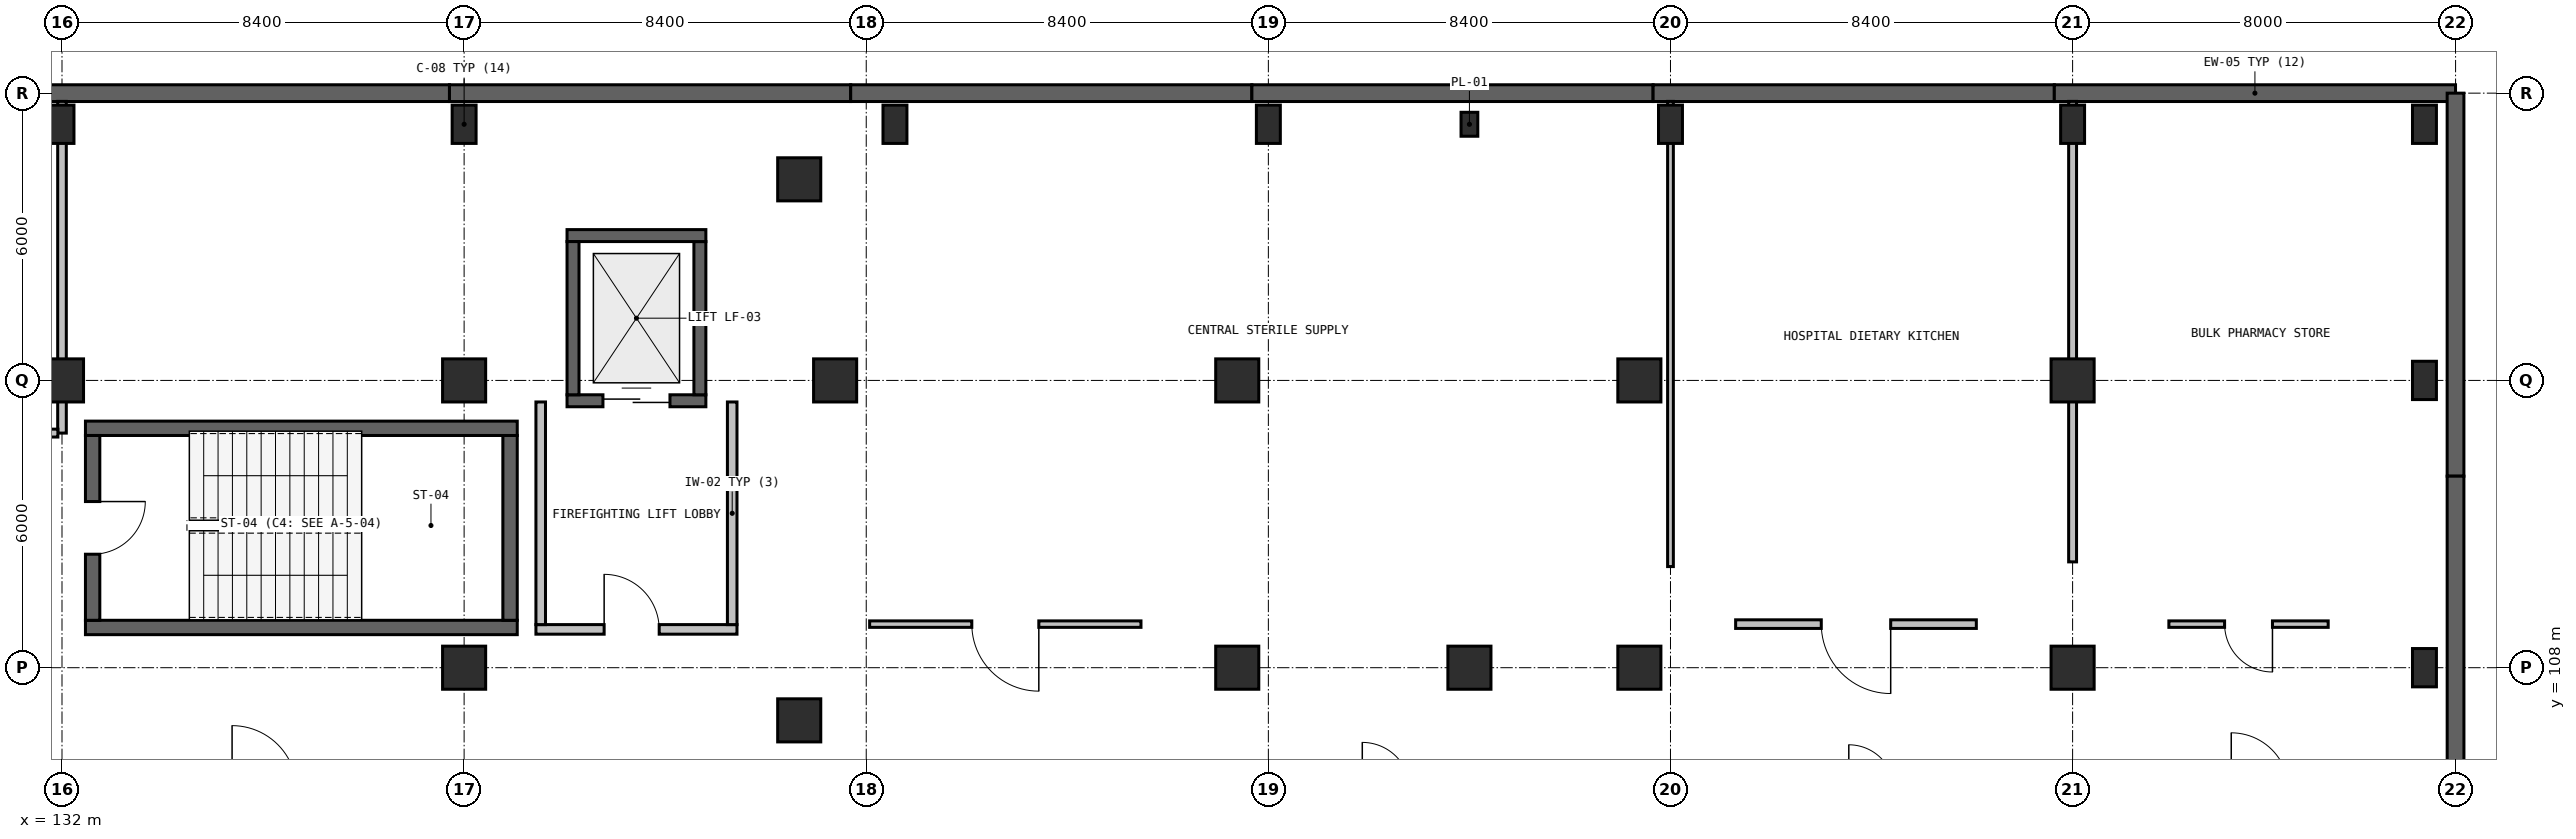
"""IFC4 building model, lengths in metres.
Left out: names, types, materials, properties, quantities, classifications, styles, units other than length and angle.
Written with IfcOpenShell. Run it as: python <this file> out.ifc"""

import sys

from ifc_helpers import new_model, si_unit, direction, frame, frame_2d, origin, origin_2d, place, context, subcontext, project, spatial, rectangle, extrude, element, fill, save


model = new_model("IFC4")
c1 = context("Model", 3, precision=1e-05, world=origin(), true_north=direction((0.0, 1.0)))
c2 = subcontext(c1, "Body", "Model", "MODEL_VIEW")
j1 = project(units=[si_unit("LENGTHUNIT", "METRE"), si_unit("PLANEANGLEUNIT", "RADIAN")], contexts=[c1])
p1 = place(None, origin())
s1 = spatial("IfcSite", under=j1, at=p1, CompositionType="ELEMENT")
p2 = place(p1, origin())
s2 = spatial("IfcBuilding", under=s1, at=p2, CompositionType="ELEMENT")
p3 = place(p2, frame((0.0, 0.0, -4.8)))
s3 = spatial("IfcBuildingStorey", under=s2, at=p3, CompositionType="ELEMENT", Elevation=-4.8)
for number, where, z_axis, x_axis in (
    (1, (147.4, 106.9, 0.0), (0.0, 0.0, 1.0), (1.0, 0.0, 0.0)),
    (2, (147.4, 118.2, 0.0), (0.0, 0.0, 1.0), (1.0, 0.0, 0.0)),
    (3, (161.4, 108.0, 0.0), (0.0, 0.0, 1.0), (1.0, 0.0, 0.0)),
):
    element("IfcColumn", number, at=place(p3, frame(where, z_axis=z_axis, x_axis=x_axis)), inside=s3, PredefinedType="COLUMN", context=c2, shape_type="SweptSolid", body=[
        extrude(rectangle(XDim=0.9, YDim=0.9, at=origin_2d()), origin(), (0.0, 0.0, 1.0), 4.8),
    ])
for number, where, z_axis, x_axis in (
    (4, (149.4, 119.35, 0.0), (0.0, 0.0, 1.0), (1.0, 0.0, 0.0)),
    (5, (157.2, 119.35, 0.0), (0.0, 0.0, 1.0), (1.0, 0.0, 0.0)),
    (6, (165.6, 119.35, 0.0), (0.0, 0.0, 1.0), (1.0, 0.0, 0.0)),
    (7, (174.0, 119.35, 0.0), (0.0, 0.0, 1.0), (1.0, 0.0, 0.0)),
    (8, (181.35, 119.35, 0.0), (0.0, 0.0, 1.0), (1.0, 0.0, 0.0)),
):
    element("IfcColumn", number, at=place(p3, frame(where, z_axis=z_axis, x_axis=x_axis)), inside=s3, PredefinedType="COLUMN", context=c2, shape_type="SweptSolid", body=[
        extrude(rectangle(XDim=0.5, YDim=0.8, at=origin_2d()), origin(), (0.0, 0.0, 1.0), 4.8),
    ])
p4 = place(p3, frame((132.0, 114.0, 0.0), z_axis=(0.0, 0.0, 1.0), x_axis=(1.0, 0.0, 0.0)))
e9 = element("IfcColumn", 9, at=p4, inside=s3, PredefinedType="COLUMN", context=c2, shape_type="SweptSolid", body=[
    extrude(rectangle(XDim=0.9, YDim=0.9, at=origin_2d()), origin(), (0.0, 0.0, 1.0), 4.8),
])
p5 = place(p3, frame((132.0, 119.35, 0.0), z_axis=(0.0, 0.0, 1.0), x_axis=(1.0, 0.0, 0.0)))
e10 = element("IfcColumn", 10, at=p5, inside=s3, PredefinedType="COLUMN", context=c2, shape_type="SweptSolid", body=[
    extrude(rectangle(XDim=0.5, YDim=0.8, at=origin_2d()), origin(), (0.0, 0.0, 1.0), 4.8),
])
for number, where, z_axis, x_axis in (
    (11, (140.4, 108.0, 0.0), (0.0, 0.0, 1.0), (1.0, 0.0, 0.0)),
    (12, (140.4, 114.0, 0.0), (0.0, 0.0, 1.0), (1.0, 0.0, 0.0)),
):
    element("IfcColumn", number, at=place(p3, frame(where, z_axis=z_axis, x_axis=x_axis)), inside=s3, PredefinedType="COLUMN", context=c2, shape_type="SweptSolid", body=[
        extrude(rectangle(XDim=0.9, YDim=0.9, at=origin_2d()), origin(), (0.0, 0.0, 1.0), 4.8),
    ])
p6 = place(p3, frame((140.4, 119.35, 0.0), z_axis=(0.0, 0.0, 1.0), x_axis=(1.0, 0.0, 0.0)))
e13 = element("IfcColumn", 13, at=p6, inside=s3, PredefinedType="COLUMN", context=c2, shape_type="SweptSolid", body=[
    extrude(rectangle(XDim=0.5, YDim=0.8, at=origin_2d()), origin(), (0.0, 0.0, 1.0), 4.8),
])
for number, where, z_axis, x_axis in (
    (14, (148.15, 114.0, 0.0), (0.0, 0.0, 1.0), (1.0, 0.0, 0.0)),
    (15, (156.55, 108.0, 0.0), (0.0, 0.0, 1.0), (1.0, 0.0, 0.0)),
    (16, (156.55, 114.0, 0.0), (0.0, 0.0, 1.0), (1.0, 0.0, 0.0)),
    (17, (164.95, 108.0, 0.0), (0.0, 0.0, 1.0), (1.0, 0.0, 0.0)),
    (18, (164.95, 114.0, 0.0), (0.0, 0.0, 1.0), (1.0, 0.0, 0.0)),
    (19, (174.0, 108.0, 0.0), (0.0, 0.0, 1.0), (1.0, 0.0, 0.0)),
    (20, (174.0, 114.0, 0.0), (0.0, 0.0, 1.0), (1.0, 0.0, 0.0)),
):
    element("IfcColumn", number, at=place(p3, frame(where, z_axis=z_axis, x_axis=x_axis)), inside=s3, PredefinedType="COLUMN", context=c2, shape_type="SweptSolid", body=[
        extrude(rectangle(XDim=0.9, YDim=0.9, at=origin_2d()), origin(), (0.0, 0.0, 1.0), 4.8),
    ])
for number, where, z_axis, x_axis in (
    (21, (181.35, 108.0, 0.0), (0.0, 0.0, 1.0), (1.0, 0.0, 0.0)),
    (22, (181.35, 114.0, 0.0), (0.0, 0.0, 1.0), (1.0, 0.0, 0.0)),
):
    element("IfcColumn", number, at=place(p3, frame(where, z_axis=z_axis, x_axis=x_axis)), inside=s3, PredefinedType="COLUMN", context=c2, shape_type="SweptSolid", body=[
        extrude(rectangle(XDim=0.5, YDim=0.8, at=origin_2d()), origin(), (0.0, 0.0, 1.0), 4.8),
    ])
p7 = place(p3, frame((161.4, 119.35, 0.0), z_axis=(0.0, 0.0, 1.0), x_axis=(1.0, 0.0, 0.0)))
e23 = element("IfcColumn", 23, at=p7, inside=s3, PredefinedType="PILASTER", context=c2, shape_type="SweptSolid", body=[
    extrude(rectangle(XDim=0.35, YDim=0.5, at=origin_2d()), origin(), (0.0, 0.0, 1.0), 4.8),
])
p8 = place(p3, frame((131.714, 120.0, 0.0), z_axis=(0.0, 0.0, 1.0), x_axis=(1.0, 0.0, 0.0)))
e24 = element("IfcWall", 24, at=p8, inside=s3, PredefinedType="SHEAR", context=c2, shape_type="SweptSolid", body=[
    extrude(rectangle(XDim=8.38, YDim=0.35, at=frame_2d((4.19, 0.0))), origin(), (0.0, 0.0, 1.0), 4.45),
])
p9 = place(p3, frame((140.094, 120.0, 0.0), z_axis=(0.0, 0.0, 1.0), x_axis=(1.0, 0.0, 0.0)))
e25 = element("IfcWall", 25, at=p9, inside=s3, PredefinedType="SHEAR", context=c2, shape_type="SweptSolid", body=[
    extrude(rectangle(XDim=8.381, YDim=0.35, at=frame_2d((4.19, 0.0))), origin(), (0.0, 0.0, 1.0), 4.45),
])
p10 = place(p3, frame((148.475, 120.0, 0.0), z_axis=(0.0, 0.0, 1.0), x_axis=(1.0, 0.0, 0.0)))
e26 = element("IfcWall", 26, at=p10, inside=s3, PredefinedType="SHEAR", context=c2, shape_type="SweptSolid", body=[
    extrude(rectangle(XDim=8.381, YDim=0.35, at=frame_2d((4.19, 0.0))), origin(), (0.0, 0.0, 1.0), 4.45),
])
p11 = place(p3, frame((156.856, 120.0, 0.0), z_axis=(0.0, 0.0, 1.0), x_axis=(1.0, 0.0, 0.0)))
e27 = element("IfcWall", 27, at=p11, inside=s3, PredefinedType="SHEAR", context=c2, shape_type="SweptSolid", body=[
    extrude(rectangle(XDim=8.381, YDim=0.35, at=frame_2d((4.19, 0.0))), origin(), (0.0, 0.0, 1.0), 4.45),
])
p12 = place(p3, frame((165.237, 120.0, 0.0), z_axis=(0.0, 0.0, 1.0), x_axis=(1.0, 0.0, 0.0)))
e28 = element("IfcWall", 28, at=p12, inside=s3, PredefinedType="SHEAR", context=c2, shape_type="SweptSolid", body=[
    extrude(rectangle(XDim=8.381, YDim=0.35, at=frame_2d((4.19, 0.0))), origin(), (0.0, 0.0, 1.0), 4.45),
])
p13 = place(p3, frame((173.618, 120.0, 0.0), z_axis=(0.0, 0.0, 1.0), x_axis=(1.0, 0.0, 0.0)))
e29 = element("IfcWall", 29, at=p13, inside=s3, PredefinedType="SHEAR", context=c2, shape_type="SweptSolid", body=[
    extrude(rectangle(XDim=8.381, YDim=0.35, at=frame_2d((4.19, 0.0))), origin(), (0.0, 0.0, 1.0), 4.45),
])
p14 = place(p3, frame((181.999, 120.0, 0.0), z_axis=(0.0, 0.0, 1.0), x_axis=(0.0, -1.0, 0.0)))
e30 = element("IfcWall", 30, at=p14, inside=s3, PredefinedType="SHEAR", context=c2, shape_type="SweptSolid", body=[
    extrude(rectangle(XDim=8.0, YDim=0.35, at=frame_2d((4.0, 0.0))), origin(), (0.0, 0.0, 1.0), 4.45),
])
p15 = place(p3, frame((181.999, 112.0, 0.0), z_axis=(0.0, 0.0, 1.0), x_axis=(0.000122085215, -0.999999992548, 0.0)))
e31 = element("IfcWall", 31, at=p15, inside=s3, PredefinedType="SHEAR", context=c2, shape_type="SweptSolid", body=[
    extrude(rectangle(XDim=7.999, YDim=0.35, at=frame_2d((4.0, 0.0))), origin(), (0.0, 0.0, 1.0), 4.45),
])
p16 = place(p3, frame((132.49, 108.84, 0.0), z_axis=(0.0, 0.0, 1.0), x_axis=(1.0, 0.0, 0.0)))
e32 = element("IfcWall", 32, at=p16, inside=s3, PredefinedType="SHEAR", context=c2, shape_type="SweptSolid", body=[
    extrude(rectangle(XDim=9.02, YDim=0.3, at=frame_2d((4.51, 0.0))), origin(), (0.0, 0.0, 1.0), 4.45),
])
p17 = place(p3, frame((141.36, 108.99, 0.0), z_axis=(0.0, 0.0, 1.0), x_axis=(0.0, 1.0, 0.0)))
e33 = element("IfcWall", 33, at=p17, inside=s3, PredefinedType="SHEAR", context=c2, shape_type="SweptSolid", body=[
    extrude(rectangle(XDim=3.86, YDim=0.3, at=frame_2d((1.93, 0.0))), origin(), (0.0, 0.0, 1.0), 4.45),
])
p18 = place(p3, frame((141.51, 113.0, 0.0), z_axis=(0.0, 0.0, 1.0), x_axis=(-1.0, 0.0, 0.0)))
e34 = element("IfcWall", 34, at=p18, inside=s3, PredefinedType="SHEAR", context=c2, shape_type="SweptSolid", body=[
    extrude(rectangle(XDim=9.02, YDim=0.3, at=frame_2d((4.51, 0.0))), origin(), (0.0, 0.0, 1.0), 4.45),
])
p19 = place(p3, frame((132.64, 112.85, 0.0), z_axis=(0.0, 0.0, 1.0), x_axis=(0.0, -1.0, 0.0)))
e35 = element("IfcWall", 35, at=p19, inside=s3, PredefinedType="SHEAR", context=c2, shape_type="SweptSolid", body=[
    extrude(rectangle(XDim=3.86, YDim=0.3, at=frame_2d((1.93, 0.0))), origin(), (0.0, 0.0, 1.0), 4.45),
])
p20 = place(p19, frame((1.38, 0.0, 0.0)))
e36 = element("IfcOpeningElement", 36, at=p20, cuts=e35, PredefinedType="OPENING", context=c2, shape_type="SweptSolid", body=[
    extrude(rectangle(XDim=1.1, YDim=2.15, at=frame_2d((0.55, 1.075))), frame((0.0, 0.16, 0.0), z_axis=(0.0, -1.0, 0.0), x_axis=(1.0, 0.0, 0.0)), (0.0, 0.0, 1.0), 0.32),
])
p21 = place(p3, frame((141.9, 108.8, 0.0), z_axis=(0.0, 0.0, 1.0), x_axis=(1.0, 0.0, 0.0)))
e37 = element("IfcWall", 37, at=p21, inside=s3, PredefinedType="SOLIDWALL", context=c2, shape_type="SweptSolid", body=[
    extrude(rectangle(XDim=4.2, YDim=0.2, at=frame_2d((2.1, 0.0))), origin(), (0.0, 0.0, 1.0), 4.45),
])
p22 = place(p21, frame((1.425, 0.0, 0.0)))
e38 = element("IfcOpeningElement", 38, at=p22, cuts=e37, PredefinedType="OPENING", context=c2, shape_type="SweptSolid", body=[
    extrude(rectangle(XDim=1.15, YDim=2.15, at=frame_2d((0.575, 1.075))), frame((0.0, 0.11, 0.0), z_axis=(0.0, -1.0, 0.0), x_axis=(1.0, 0.0, 0.0)), (0.0, 0.0, 1.0), 0.22),
])
for number, where, z_axis, x_axis in (
    (39, (146.0, 108.9, 0.0), (0.0, 0.0, 1.0), (0.0, 1.0, 0.0)),
    (40, (142.0, 113.55, 0.0), (0.0, 0.0, 1.0), (0.0, -1.0, 0.0)),
):
    element("IfcWall", number, at=place(p3, frame(where, z_axis=z_axis, x_axis=x_axis)), inside=s3, PredefinedType="SOLIDWALL", context=c2, shape_type="SweptSolid", body=[
        extrude(rectangle(XDim=4.65, YDim=0.2, at=frame_2d((2.325, 0.0))), origin(), (0.0, 0.0, 1.0), 4.45),
    ])
p23 = place(p3, frame((142.55, 113.575, 0.0), z_axis=(0.0, 0.0, 1.0), x_axis=(1.0, 0.0, 0.0)))
e41 = element("IfcWall", 41, at=p23, inside=s3, PredefinedType="SHEAR", context=c2, shape_type="SweptSolid", body=[
    extrude(rectangle(XDim=2.9, YDim=0.25, at=frame_2d((1.45, 0.0))), origin(), (0.0, 0.0, 1.0), 4.45),
])
p24 = place(p23, frame((0.75, 0.0, 0.0)))
e42 = element("IfcOpeningElement", 42, at=p24, cuts=e41, PredefinedType="OPENING", context=c2, shape_type="SweptSolid", body=[
    extrude(rectangle(XDim=1.4, YDim=2.15, at=frame_2d((0.7, 1.075))), frame((0.0, 0.135, 0.0), z_axis=(0.0, -1.0, 0.0), x_axis=(1.0, 0.0, 0.0)), (0.0, 0.0, 1.0), 0.27),
])
p25 = place(p3, frame((145.325, 113.7, 0.0), z_axis=(0.0, 0.0, 1.0), x_axis=(0.0, 1.0, 0.0)))
e43 = element("IfcWall", 43, at=p25, inside=s3, PredefinedType="SHEAR", context=c2, shape_type="SweptSolid", body=[
    extrude(rectangle(XDim=3.2, YDim=0.25, at=frame_2d((1.6, 0.0))), origin(), (0.0, 0.0, 1.0), 4.45),
])
p26 = place(p3, frame((145.45, 117.025, 0.0), z_axis=(0.0, 0.0, 1.0), x_axis=(-1.0, 0.0, 0.0)))
e44 = element("IfcWall", 44, at=p26, inside=s3, PredefinedType="SHEAR", context=c2, shape_type="SweptSolid", body=[
    extrude(rectangle(XDim=2.9, YDim=0.25, at=frame_2d((1.45, 0.0))), origin(), (0.0, 0.0, 1.0), 4.45),
])
p27 = place(p3, frame((142.675, 116.9, 0.0), z_axis=(0.0, 0.0, 1.0), x_axis=(0.0, -1.0, 0.0)))
e45 = element("IfcWall", 45, at=p27, inside=s3, PredefinedType="SHEAR", context=c2, shape_type="SweptSolid", body=[
    extrude(rectangle(XDim=3.2, YDim=0.25, at=frame_2d((1.6, 0.0))), origin(), (0.0, 0.0, 1.0), 4.45),
])
p28 = place(p3, frame((132.0, 119.828, 0.0), z_axis=(0.0, 0.0, 1.0), x_axis=(0.0, -1.0, 0.0)))
e46 = element("IfcWall", 46, at=p28, inside=s3, PredefinedType="PARTITIONING", context=c2, shape_type="SweptSolid", body=[
    extrude(rectangle(XDim=6.928, YDim=0.18, at=frame_2d((3.464, 0.0))), origin(), (0.0, 0.0, 1.0), 3.7),
])
p29 = place(p3, frame((131.914, 112.9, 0.0), z_axis=(0.0, 0.0, 1.0), x_axis=(-1.0, 0.0, 0.0)))
e47 = element("IfcWall", 47, at=p29, inside=s3, PredefinedType="PARTITIONING", context=c2, shape_type="SweptSolid", body=[
    extrude(rectangle(XDim=1.904, YDim=0.165, at=frame_2d((0.952, 0.0))), origin(), (0.0, 0.0, 1.0), 4.45),
])
p30 = place(p3, frame((154.539, 108.91, 0.0), z_axis=(0.0, 0.0, 1.0), x_axis=(-1.0, 0.0, 0.0)))
e48 = element("IfcWall", 48, at=p30, inside=s3, PredefinedType="PARTITIONING", context=c2, shape_type="SweptSolid", body=[
    extrude(rectangle(XDim=5.668, YDim=0.135, at=frame_2d((2.834, 0.0))), origin(), (0.0, 0.0, 1.0), 4.45),
])
p31 = place(p30, frame((2.134, 0.0, 0.0)))
e49 = element("IfcOpeningElement", 49, at=p31, cuts=e48, PredefinedType="OPENING", context=c2, shape_type="SweptSolid", body=[
    extrude(rectangle(XDim=1.4, YDim=2.15, at=frame_2d((0.7, 1.075))), frame((0.0, 0.077, 0.0), z_axis=(0.0, -1.0, 0.0), x_axis=(1.0, 0.0, 0.0)), (0.0, 0.0, 1.0), 0.155),
])
p32 = place(p3, frame((165.6, 119.828, 0.0), z_axis=(0.0, 0.0, 1.0), x_axis=(0.0, -1.0, 0.0)))
e50 = element("IfcWall", 50, at=p32, inside=s3, PredefinedType="PARTITIONING", context=c2, shape_type="SweptSolid", body=[
    extrude(rectangle(XDim=9.716, YDim=0.12, at=frame_2d((4.858, 0.0))), origin(), (0.0, 0.0, 1.0), 4.45),
])
p33 = place(p3, frame((171.989, 108.91, 0.0), z_axis=(0.0, 0.0, 1.0), x_axis=(-1.0, 0.0, 0.0)))
e51 = element("IfcWall", 51, at=p33, inside=s3, PredefinedType="PARTITIONING", context=c2, shape_type="SweptSolid", body=[
    extrude(rectangle(XDim=5.028, YDim=0.18, at=frame_2d((2.514, 0.0))), origin(), (0.0, 0.0, 1.0), 4.45),
])
p34 = place(p33, frame((1.789, 0.0, 0.0)))
e52 = element("IfcOpeningElement", 52, at=p34, cuts=e51, PredefinedType="OPENING", context=c2, shape_type="SweptSolid", body=[
    extrude(rectangle(XDim=1.45, YDim=2.15, at=frame_2d((0.725, 1.075))), frame((0.0, 0.1, 0.0), z_axis=(0.0, -1.0, 0.0), x_axis=(1.0, 0.0, 0.0)), (0.0, 0.0, 1.0), 0.2),
])
p35 = place(p3, frame((174.0, 119.828, 0.0), z_axis=(0.0, 0.0, 1.0), x_axis=(0.0, -1.0, 0.0)))
e53 = element("IfcWall", 53, at=p35, inside=s3, PredefinedType="PARTITIONING", context=c2, shape_type="SweptSolid", body=[
    extrude(rectangle(XDim=9.618, YDim=0.165, at=frame_2d((4.809, 0.0))), origin(), (0.0, 0.0, 1.0), 3.7),
])
p36 = place(p3, frame((179.339, 108.91, 0.0), z_axis=(0.0, 0.0, 1.0), x_axis=(-1.0, 0.0, 0.0)))
e54 = element("IfcWall", 54, at=p36, inside=s3, PredefinedType="PARTITIONING", context=c2, shape_type="SweptSolid", body=[
    extrude(rectangle(XDim=3.328, YDim=0.135, at=frame_2d((1.664, 0.0))), origin(), (0.0, 0.0, 1.0), 4.45),
])
p37 = place(p36, frame((1.164, 0.0, 0.0)))
e55 = element("IfcOpeningElement", 55, at=p37, cuts=e54, PredefinedType="OPENING", context=c2, shape_type="SweptSolid", body=[
    extrude(rectangle(XDim=1.0, YDim=2.15, at=frame_2d((0.5, 1.075))), frame((0.0, 0.077, 0.0), z_axis=(0.0, -1.0, 0.0), x_axis=(1.0, 0.0, 0.0)), (0.0, 0.0, 1.0), 0.155),
])
p38 = place(p20, origin())
e56 = element("IfcDoor", 56, at=p38, inside=s3, OperationType="SINGLE_SWING_RIGHT", PredefinedType="DOOR", context=c2, shape_type="SweptSolid", body=[
    extrude(rectangle(XDim=1.1, YDim=2.15, at=frame_2d((0.55, 1.075))), frame((0.0, 0.025, 0.0), z_axis=(0.0, -1.0, 0.0), x_axis=(1.0, 0.0, 0.0)), (0.0, 0.0, 1.0), 0.05),
])
fill(e36, e56)
p39 = place(p22, origin())
e57 = element("IfcDoor", 57, at=p39, inside=s3, OperationType="SINGLE_SWING_LEFT", PredefinedType="DOOR", context=c2, shape_type="SweptSolid", body=[
    extrude(rectangle(XDim=1.15, YDim=2.15, at=frame_2d((0.575, 1.075))), frame((0.0, 0.025, 0.0), z_axis=(0.0, -1.0, 0.0), x_axis=(1.0, 0.0, 0.0)), (0.0, 0.0, 1.0), 0.05),
])
fill(e38, e57)
p40 = place(p24, origin())
e58 = element("IfcDoor", 58, at=p40, inside=s3, OperationType="DOUBLE_DOOR_SLIDING", PredefinedType="DOOR", context=c2, shape_type="SweptSolid", body=[
    extrude(rectangle(XDim=1.4, YDim=2.15, at=frame_2d((0.7, 1.075))), frame((0.0, 0.025, 0.0), z_axis=(0.0, -1.0, 0.0), x_axis=(1.0, 0.0, 0.0)), (0.0, 0.0, 1.0), 0.05),
])
fill(e42, e58)
p41 = place(p31, origin())
e59 = element("IfcDoor", 59, at=p41, inside=s3, OperationType="SINGLE_SWING_RIGHT", PredefinedType="DOOR", context=c2, shape_type="SweptSolid", body=[
    extrude(rectangle(XDim=1.4, YDim=2.15, at=frame_2d((0.7, 1.075))), frame((0.0, 0.025, 0.0), z_axis=(0.0, -1.0, 0.0), x_axis=(1.0, 0.0, 0.0)), (0.0, 0.0, 1.0), 0.05),
])
fill(e49, e59)
p42 = place(p34, origin())
e60 = element("IfcDoor", 60, at=p42, inside=s3, OperationType="SINGLE_SWING_LEFT", PredefinedType="DOOR", context=c2, shape_type="SweptSolid", body=[
    extrude(rectangle(XDim=1.45, YDim=2.15, at=frame_2d((0.725, 1.075))), frame((0.0, 0.025, 0.0), z_axis=(0.0, -1.0, 0.0), x_axis=(1.0, 0.0, 0.0)), (0.0, 0.0, 1.0), 0.05),
])
fill(e52, e60)
p43 = place(p37, origin())
e61 = element("IfcDoor", 61, at=p43, inside=s3, OperationType="SINGLE_SWING_RIGHT", PredefinedType="DOOR", context=c2, shape_type="SweptSolid", body=[
    extrude(rectangle(XDim=1.0, YDim=2.15, at=frame_2d((0.5, 1.075))), frame((0.0, 0.025, 0.0), z_axis=(0.0, -1.0, 0.0), x_axis=(1.0, 0.0, 0.0)), (0.0, 0.0, 1.0), 0.05),
])
fill(e55, e61)
save(model, sys.argv[1])
